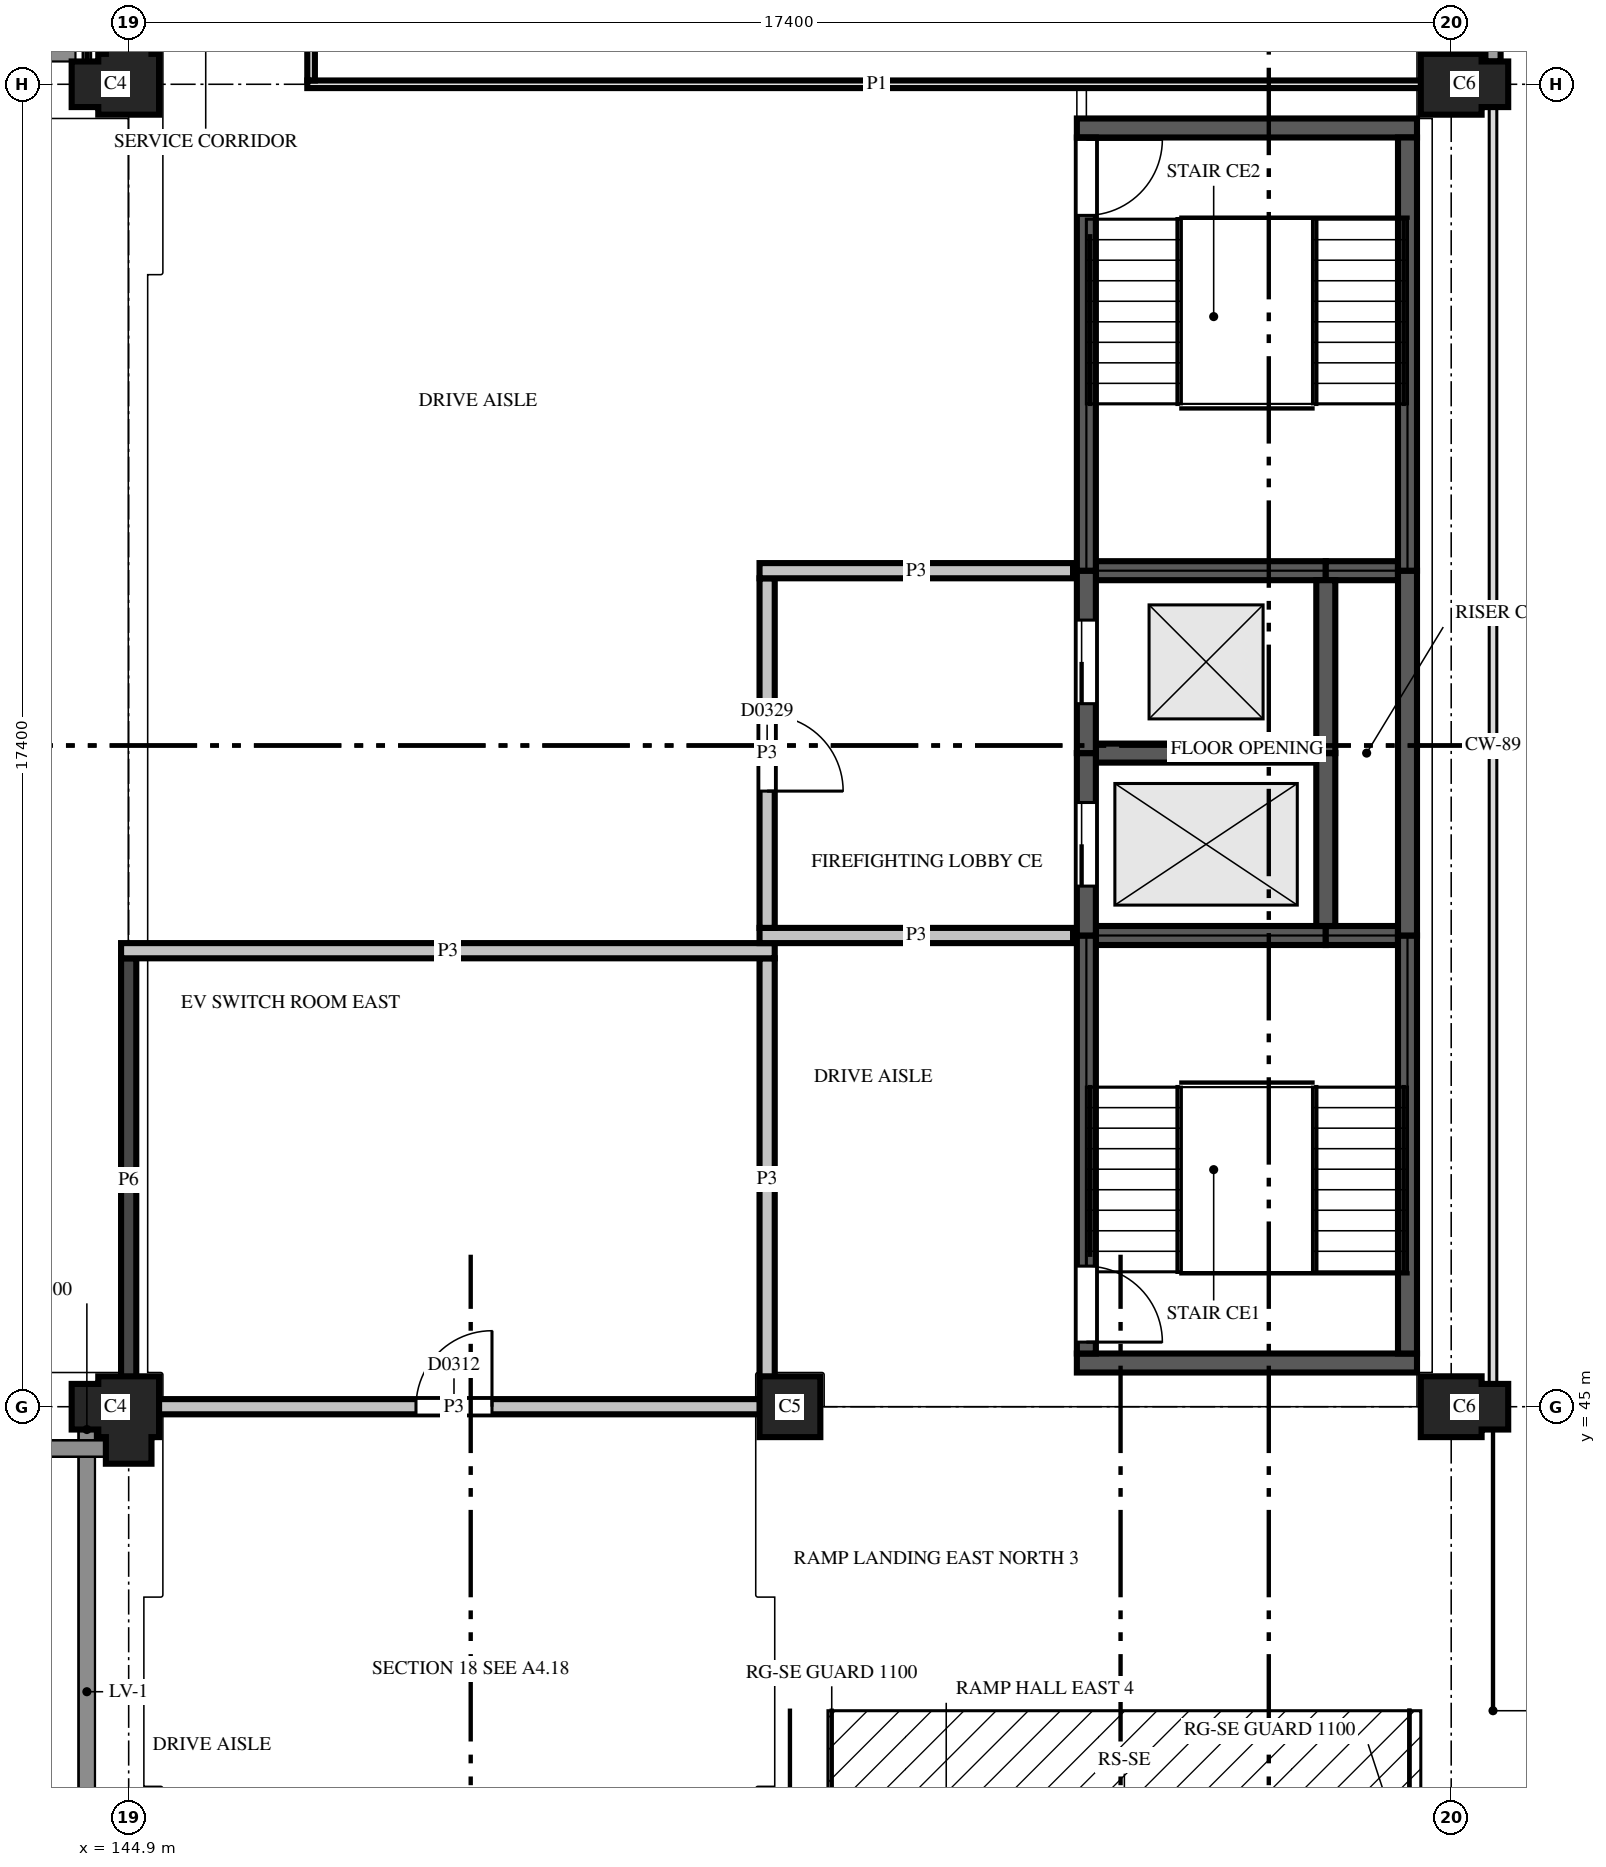
"""IFC4 building model, lengths in metres.
Left out: names, types, materials, properties, quantities, classifications, styles, units other than length and angle.
Written with IfcOpenShell. Run it as: python <this file> out.ifc"""

import sys

from ifc_helpers import new_model, si_unit, direction, frame, frame_2d, origin, place, context, subcontext, project, spatial, polyline, rectangle, outline, extrude, element, fill, save


model = new_model("IFC4")
c1 = context("Model", 3, precision=1e-05, world=origin(), true_north=direction((0.0, 1.0)))
c2 = subcontext(c1, "Body", "Model", "MODEL_VIEW")
j1 = project(units=[si_unit("LENGTHUNIT", "METRE"), si_unit("PLANEANGLEUNIT", "RADIAN")], contexts=[c1])
p1 = place(None, origin())
s1 = spatial("IfcSite", under=j1, at=p1, CompositionType="ELEMENT")
p2 = place(p1, origin())
s2 = spatial("IfcBuilding", under=s1, at=p2, CompositionType="ELEMENT")
p3 = place(p2, frame((0.0, 0.0, 11.9)))
s3 = spatial("IfcBuildingStorey", under=s2, at=p3, CompositionType="ELEMENT", Elevation=11.9)
p4 = place(p3, frame((144.9, 45.0, 0.0), z_axis=(0.0, 0.0, 1.0), x_axis=(-1.0, 0.0, 0.0)))
e1 = element("IfcColumn", 1, at=p4, inside=s3, PredefinedType="COLUMN", context=c2, shape_type="SweptSolid", body=[
    extrude(outline(polyline([(-0.4, -0.4), (0.4, -0.4), (0.4, -0.3), (0.75, -0.3), (0.75, 0.3), (0.4, 0.3), (0.4, 0.4), (0.3, 0.4), (0.3, 0.75), (-0.3, 0.75), (-0.3, 0.4), (-0.4, 0.4), (-0.4, -0.4)])), origin(), (0.0, 0.0, 1.0), 3.7),
])
p5 = place(p3, frame((153.6, 45.0, 0.0), z_axis=(0.0, 0.0, 1.0), x_axis=(1.0, 0.0, 0.0)))
e2 = element("IfcColumn", 2, at=p5, inside=s3, PredefinedType="COLUMN", context=c2, shape_type="SweptSolid", body=[
    extrude(outline(polyline([(-0.4, -0.4), (0.4, -0.4), (0.4, 0.4), (-0.4, 0.4), (-0.4, -0.4)])), origin(), (0.0, 0.0, 1.0), 3.7),
])
p6 = place(p3, frame((162.3, 45.0, 0.0), z_axis=(0.0, 0.0, 1.0), x_axis=(1.0, 0.0, 0.0)))
e3 = element("IfcColumn", 3, at=p6, inside=s3, PredefinedType="COLUMN", context=c2, shape_type="SweptSolid", body=[
    extrude(outline(polyline([(-0.4, -0.4), (0.4, -0.4), (0.4, -0.3), (0.75, -0.3), (0.75, 0.3), (0.4, 0.3), (0.4, 0.4), (-0.4, 0.4), (-0.4, -0.4)])), origin(), (0.0, 0.0, 1.0), 3.7),
])
p7 = place(p3, frame((144.9, 62.4, 0.0), z_axis=(0.0, 0.0, 1.0), x_axis=(0.0, 1.0, 0.0)))
e4 = element("IfcColumn", 4, at=p7, inside=s3, PredefinedType="COLUMN", context=c2, shape_type="SweptSolid", body=[
    extrude(outline(polyline([(-0.4, -0.4), (0.4, -0.4), (0.4, -0.3), (0.75, -0.3), (0.75, 0.3), (0.4, 0.3), (0.4, 0.4), (0.3, 0.4), (0.3, 0.75), (-0.3, 0.75), (-0.3, 0.4), (-0.4, 0.4), (-0.4, -0.4)])), origin(), (0.0, 0.0, 1.0), 3.7),
])
p8 = place(p3, frame((162.3, 62.4, 0.0), z_axis=(0.0, 0.0, 1.0), x_axis=(1.0, 0.0, 0.0)))
e5 = element("IfcColumn", 5, at=p8, inside=s3, PredefinedType="COLUMN", context=c2, shape_type="SweptSolid", body=[
    extrude(outline(polyline([(-0.4, -0.4), (0.4, -0.4), (0.4, -0.3), (0.75, -0.3), (0.75, 0.3), (0.4, 0.3), (0.4, 0.4), (-0.4, 0.4), (-0.4, -0.4)])), origin(), (0.0, 0.0, 1.0), 3.7),
])
p9 = place(p3, frame((157.375, 45.575, 0.0), z_axis=(0.0, 0.0, 1.0), x_axis=(1.0, 0.0, 0.0)))
e6 = element("IfcWall", 6, at=p9, inside=s3, PredefinedType="SHEAR", context=c2, shape_type="SweptSolid", body=[
    extrude(rectangle(XDim=4.475, YDim=0.25, at=frame_2d((2.238, 0.0))), origin(), (0.0, 0.0, 1.0), 3.7),
])
p10 = place(p3, frame((157.625, 51.2, 0.0), z_axis=(0.0, 0.0, 1.0), x_axis=(1.0, 0.0, 0.0)))
e7 = element("IfcWall", 7, at=p10, inside=s3, PredefinedType="SHEAR", context=c2, shape_type="SweptSolid", body=[
    extrude(rectangle(XDim=3.025, YDim=0.25, at=frame_2d((1.512, 0.0))), origin(), (0.0, 0.0, 1.0), 3.7),
])
p11 = place(p3, frame((160.65, 51.2, 0.0), z_axis=(0.0, 0.0, 1.0), x_axis=(1.0, 0.0, 0.0)))
e8 = element("IfcWall", 8, at=p11, inside=s3, PredefinedType="SHEAR", context=c2, shape_type="SweptSolid", body=[
    extrude(rectangle(XDim=0.95, YDim=0.25, at=frame_2d((0.475, 0.0))), origin(), (0.0, 0.0, 1.0), 3.7),
])
p12 = place(p3, frame((157.625, 53.6, 0.0), z_axis=(0.0, 0.0, 1.0), x_axis=(1.0, 0.0, 0.0)))
e9 = element("IfcWall", 9, at=p12, inside=s3, PredefinedType="SHEAR", context=c2, shape_type="SweptSolid", body=[
    extrude(rectangle(XDim=2.9, YDim=0.25, at=frame_2d((1.45, 0.0))), origin(), (0.0, 0.0, 1.0), 3.7),
])
p13 = place(p3, frame((157.625, 56.0, 0.0), z_axis=(0.0, 0.0, 1.0), x_axis=(1.0, 0.0, 0.0)))
e10 = element("IfcWall", 10, at=p13, inside=s3, PredefinedType="SHEAR", context=c2, shape_type="SweptSolid", body=[
    extrude(rectangle(XDim=3.025, YDim=0.25, at=frame_2d((1.512, 0.0))), origin(), (0.0, 0.0, 1.0), 3.7),
])
p14 = place(p3, frame((160.65, 56.0, 0.0), z_axis=(0.0, 0.0, 1.0), x_axis=(1.0, 0.0, 0.0)))
e11 = element("IfcWall", 11, at=p14, inside=s3, PredefinedType="SHEAR", context=c2, shape_type="SweptSolid", body=[
    extrude(rectangle(XDim=0.95, YDim=0.25, at=frame_2d((0.475, 0.0))), origin(), (0.0, 0.0, 1.0), 3.7),
])
p15 = place(p3, frame((157.375, 61.825, 0.0), z_axis=(0.0, 0.0, 1.0), x_axis=(1.0, 0.0, 0.0)))
e12 = element("IfcWall", 12, at=p15, inside=s3, PredefinedType="SHEAR", context=c2, shape_type="SweptSolid", body=[
    extrude(rectangle(XDim=4.475, YDim=0.25, at=frame_2d((2.238, 0.0))), origin(), (0.0, 0.0, 1.0), 3.7),
])
p16 = place(p3, frame((157.5, 45.7, 0.0), z_axis=(0.0, 0.0, 1.0), x_axis=(0.0, 1.0, 0.0)))
e13 = element("IfcWall", 13, at=p16, inside=s3, PredefinedType="SHEAR", context=c2, shape_type="SweptSolid", body=[
    extrude(rectangle(XDim=5.5, YDim=0.25, at=frame_2d((2.75, 0.0))), origin(), (0.0, 0.0, 1.0), 3.7),
])
p17 = place(p16, frame((0.15, 0.0, 0.0)))
e14 = element("IfcOpeningElement", 14, at=p17, cuts=e13, PredefinedType="OPENING", context=c2, shape_type="SweptSolid", body=[
    extrude(rectangle(XDim=1.0, YDim=2.1, at=frame_2d((0.5, 1.05))), frame((0.0, 0.135, 0.0), z_axis=(0.0, -1.0, 0.0), x_axis=(1.0, 0.0, 0.0)), (0.0, 0.0, 1.0), 0.27),
])
p18 = place(p3, frame((157.5, 51.2, 0.0), z_axis=(0.0, 0.0, 1.0), x_axis=(0.0, 1.0, 0.0)))
e15 = element("IfcWall", 15, at=p18, inside=s3, PredefinedType="SHEAR", context=c2, shape_type="SweptSolid", body=[
    extrude(rectangle(XDim=2.4, YDim=0.25, at=frame_2d((1.2, 0.0))), origin(), (0.0, 0.0, 1.0), 3.7),
])
p19 = place(p18, frame((0.65, 0.0, 0.0)))
e16 = element("IfcOpeningElement", 16, at=p19, cuts=e15, PredefinedType="OPENING", context=c2, shape_type="SweptSolid", body=[
    extrude(rectangle(XDim=1.1, YDim=2.1, at=frame_2d((0.55, 1.05))), frame((0.0, 0.135, 0.0), z_axis=(0.0, -1.0, 0.0), x_axis=(1.0, 0.0, 0.0)), (0.0, 0.0, 1.0), 0.27),
])
p20 = place(p3, frame((157.5, 53.6, 0.0), z_axis=(0.0, 0.0, 1.0), x_axis=(0.0, 1.0, 0.0)))
e17 = element("IfcWall", 17, at=p20, inside=s3, PredefinedType="SHEAR", context=c2, shape_type="SweptSolid", body=[
    extrude(rectangle(XDim=2.4, YDim=0.25, at=frame_2d((1.2, 0.0))), origin(), (0.0, 0.0, 1.0), 3.7),
])
p21 = place(p20, frame((0.65, 0.0, 0.0)))
e18 = element("IfcOpeningElement", 18, at=p21, cuts=e17, PredefinedType="OPENING", context=c2, shape_type="SweptSolid", body=[
    extrude(rectangle(XDim=1.1, YDim=2.1, at=frame_2d((0.55, 1.05))), frame((0.0, 0.135, 0.0), z_axis=(0.0, -1.0, 0.0), x_axis=(1.0, 0.0, 0.0)), (0.0, 0.0, 1.0), 0.27),
])
p22 = place(p3, frame((157.5, 56.0, 0.0), z_axis=(0.0, 0.0, 1.0), x_axis=(0.0, 1.0, 0.0)))
e19 = element("IfcWall", 19, at=p22, inside=s3, PredefinedType="SHEAR", context=c2, shape_type="SweptSolid", body=[
    extrude(rectangle(XDim=5.7, YDim=0.25, at=frame_2d((2.85, 0.0))), origin(), (0.0, 0.0, 1.0), 3.7),
])
p23 = place(p22, frame((4.675, 0.0, 0.0)))
e20 = element("IfcOpeningElement", 20, at=p23, cuts=e19, PredefinedType="OPENING", context=c2, shape_type="SweptSolid", body=[
    extrude(rectangle(XDim=1.0, YDim=2.1, at=frame_2d((0.5, 1.05))), frame((0.0, 0.135, 0.0), z_axis=(0.0, -1.0, 0.0), x_axis=(1.0, 0.0, 0.0)), (0.0, 0.0, 1.0), 0.27),
])
p24 = place(p3, frame((160.65, 51.325, 0.0), z_axis=(0.0, 0.0, 1.0), x_axis=(0.0, 1.0, 0.0)))
e21 = element("IfcWall", 21, at=p24, inside=s3, PredefinedType="SHEAR", context=c2, shape_type="SweptSolid", body=[
    extrude(rectangle(XDim=2.275, YDim=0.25, at=frame_2d((1.138, 0.0))), origin(), (0.0, 0.0, 1.0), 3.7),
])
p25 = place(p3, frame((160.65, 53.6, 0.0), z_axis=(0.0, 0.0, 1.0), x_axis=(0.0, 1.0, 0.0)))
e22 = element("IfcWall", 22, at=p25, inside=s3, PredefinedType="SHEAR", context=c2, shape_type="SweptSolid", body=[
    extrude(rectangle(XDim=2.275, YDim=0.25, at=frame_2d((1.137, 0.0))), origin(), (0.0, 0.0, 1.0), 3.7),
])
p26 = place(p3, frame((161.725, 45.7, 0.0), z_axis=(0.0, 0.0, 1.0), x_axis=(0.0, 1.0, 0.0)))
e23 = element("IfcWall", 23, at=p26, inside=s3, PredefinedType="SHEAR", context=c2, shape_type="SweptSolid", body=[
    extrude(rectangle(XDim=5.5, YDim=0.25, at=frame_2d((2.75, 0.0))), origin(), (0.0, 0.0, 1.0), 3.7),
])
p27 = place(p3, frame((161.725, 51.2, 0.0), z_axis=(0.0, 0.0, 1.0), x_axis=(0.0, 1.0, 0.0)))
e24 = element("IfcWall", 24, at=p27, inside=s3, PredefinedType="SHEAR", context=c2, shape_type="SweptSolid", body=[
    extrude(rectangle(XDim=4.8, YDim=0.25, at=frame_2d((2.4, 0.0))), origin(), (0.0, 0.0, 1.0), 3.7),
])
p28 = place(p3, frame((161.725, 56.0, 0.0), z_axis=(0.0, 0.0, 1.0), x_axis=(0.0, 1.0, 0.0)))
e25 = element("IfcWall", 25, at=p28, inside=s3, PredefinedType="SHEAR", context=c2, shape_type="SweptSolid", body=[
    extrude(rectangle(XDim=5.7, YDim=0.25, at=frame_2d((2.85, 0.0))), origin(), (0.0, 0.0, 1.0), 3.7),
])
p29 = place(p3, frame((162.85, 62.7, 0.0), z_axis=(0.0, 0.0, 1.0), x_axis=(0.0, 1.0, 0.0)))
e26 = element("IfcWall", 26, at=p29, inside=s3, PredefinedType="SOLIDWALL", context=c2, shape_type="SweptSolid", body=[
    extrude(rectangle(XDim=6.9, YDim=0.2, at=frame_2d((3.45, 0.0))), origin(), (0.0, 0.0, 1.0), 2.3),
])
p30 = place(p29, frame((2.25, 0.0, 0.55)))
e27 = element("IfcOpeningElement", 27, at=p30, cuts=e26, PredefinedType="OPENING", context=c2, shape_type="SweptSolid", body=[
    extrude(rectangle(XDim=2.4, YDim=1.0, at=frame_2d((1.2, 0.5))), frame((0.0, 0.11, 0.0), z_axis=(0.0, -1.0, 0.0), x_axis=(1.0, 0.0, 0.0)), (0.0, 0.0, 1.0), 0.22),
])
p31 = place(p3, frame((144.96, 45.0, 0.0), z_axis=(0.0, 0.0, 1.0), x_axis=(1.0, 0.0, 0.0)))
e28 = element("IfcWall", 28, at=p31, inside=s3, PredefinedType="PARTITIONING", context=c2, shape_type="SweptSolid", body=[
    extrude(rectangle(XDim=8.44, YDim=0.2, at=frame_2d((4.22, 0.0))), origin(), (0.0, 0.0, 1.0), 2.88),
])
p32 = place(p31, frame((3.72, 0.0, 0.0)))
e29 = element("IfcOpeningElement", 29, at=p32, cuts=e28, PredefinedType="OPENING", context=c2, shape_type="SweptSolid", body=[
    extrude(rectangle(XDim=1.0, YDim=2.1, at=frame_2d((0.5, 1.05))), frame((0.0, 0.11, 0.0), z_axis=(0.0, -1.0, 0.0), x_axis=(1.0, 0.0, 0.0)), (0.0, 0.0, 1.0), 0.22),
])
p33 = place(p3, frame((153.3, 45.1, 0.0), z_axis=(0.0, 0.0, 1.0), x_axis=(0.0, 1.0, 0.0)))
e30 = element("IfcWall", 30, at=p33, inside=s3, PredefinedType="PARTITIONING", context=c2, shape_type="SweptSolid", body=[
    extrude(rectangle(XDim=5.8, YDim=0.2, at=frame_2d((2.9, 0.0))), origin(), (0.0, 0.0, 1.0), 2.88),
])
p34 = place(p3, frame((144.9, 50.9, 0.0), z_axis=(0.0, 0.0, 1.0), x_axis=(0.0, -1.0, 0.0)))
e31 = element("IfcWall", 31, at=p34, inside=s3, PredefinedType="PARTITIONING", context=c2, shape_type="SweptSolid", body=[
    extrude(rectangle(XDim=5.84, YDim=0.2, at=frame_2d((2.92, 0.0))), origin(), (0.0, 0.0, 1.0), 2.2),
])
p35 = place(p3, frame((153.4, 51.0, 0.0), z_axis=(0.0, 0.0, 1.0), x_axis=(-1.0, 0.0, 0.0)))
e32 = element("IfcWall", 32, at=p35, inside=s3, PredefinedType="PARTITIONING", context=c2, shape_type="SweptSolid", body=[
    extrude(rectangle(XDim=8.6, YDim=0.2, at=frame_2d((4.3, 0.0))), origin(), (0.0, 0.0, 1.0), 2.88),
])
p36 = place(p3, frame((153.2, 51.2, 0.0), z_axis=(0.0, 0.0, 1.0), x_axis=(1.0, 0.0, 0.0)))
e33 = element("IfcWall", 33, at=p36, inside=s3, PredefinedType="PARTITIONING", context=c2, shape_type="SweptSolid", body=[
    extrude(rectangle(XDim=4.125, YDim=0.2, at=frame_2d((2.062, 0.0))), origin(), (0.0, 0.0, 1.0), 2.88),
])
p37 = place(p3, frame((153.3, 55.9, 0.0), z_axis=(0.0, 0.0, 1.0), x_axis=(0.0, -1.0, 0.0)))
e34 = element("IfcWall", 34, at=p37, inside=s3, PredefinedType="PARTITIONING", context=c2, shape_type="SweptSolid", body=[
    extrude(rectangle(XDim=4.6, YDim=0.2, at=frame_2d((2.3, 0.0))), origin(), (0.0, 0.0, 1.0), 2.88),
])
p38 = place(p37, frame((1.8, 0.0, 0.0)))
e35 = element("IfcOpeningElement", 35, at=p38, cuts=e34, PredefinedType="OPENING", context=c2, shape_type="SweptSolid", body=[
    extrude(rectangle(XDim=1.0, YDim=2.1, at=frame_2d((0.5, 1.05))), frame((0.0, 0.11, 0.0), z_axis=(0.0, -1.0, 0.0), x_axis=(1.0, 0.0, 0.0)), (0.0, 0.0, 1.0), 0.22),
])
p39 = place(p3, frame((157.325, 56.0, 0.0), z_axis=(0.0, 0.0, 1.0), x_axis=(-1.0, 0.0, 0.0)))
e36 = element("IfcWall", 36, at=p39, inside=s3, PredefinedType="PARTITIONING", context=c2, shape_type="SweptSolid", body=[
    extrude(rectangle(XDim=4.125, YDim=0.2, at=frame_2d((2.062, 0.0))), origin(), (0.0, 0.0, 1.0), 2.88),
])
p40 = place(p3, frame((147.25, 62.4, 0.0), z_axis=(0.0, 0.0, 1.0), x_axis=(1.0, 0.0, 0.0)))
e37 = element("IfcWall", 37, at=p40, inside=s3, PredefinedType="PARTITIONING", context=c2, shape_type="SweptSolid", body=[
    extrude(rectangle(XDim=14.99, YDim=0.1, at=frame_2d((7.495, 0.0))), origin(), (0.0, 0.0, 1.0), 2.88),
])
p41 = place(p3, frame((147.3, 77.35, 0.0), z_axis=(0.0, 0.0, 1.0), x_axis=(0.0, -1.0, 0.0)))
e38 = element("IfcWall", 38, at=p41, inside=s3, PredefinedType="PARTITIONING", context=c2, shape_type="SweptSolid", body=[
    extrude(rectangle(XDim=14.9, YDim=0.1, at=frame_2d((7.45, 0.0))), origin(), (0.0, 0.0, 1.0), 2.88),
])
p42 = place(p41, frame((7.0, 0.0, 0.0)))
e39 = element("IfcOpeningElement", 39, at=p42, cuts=e38, PredefinedType="OPENING", context=c2, shape_type="SweptSolid", body=[
    extrude(rectangle(XDim=0.9, YDim=2.1, at=frame_2d((0.45, 1.05))), frame((0.0, 0.06, 0.0), z_axis=(0.0, -1.0, 0.0), x_axis=(1.0, 0.0, 0.0)), (0.0, 0.0, 1.0), 0.12),
])
p43 = place(p32, origin())
e40 = element("IfcDoor", 40, at=p43, inside=s3, OperationType="SINGLE_SWING_LEFT", PredefinedType="DOOR", context=c2, shape_type="SweptSolid", body=[
    extrude(rectangle(XDim=1.0, YDim=2.1, at=frame_2d((0.5, 1.05))), frame((0.0, 0.025, 0.0), z_axis=(0.0, -1.0, 0.0), x_axis=(1.0, 0.0, 0.0)), (0.0, 0.0, 1.0), 0.05),
])
fill(e29, e40)
p44 = place(p38, origin())
e41 = element("IfcDoor", 41, at=p44, inside=s3, OperationType="SINGLE_SWING_LEFT", PredefinedType="DOOR", context=c2, shape_type="SweptSolid", body=[
    extrude(rectangle(XDim=1.0, YDim=2.1, at=frame_2d((0.5, 1.05))), frame((0.0, 0.025, 0.0), z_axis=(0.0, -1.0, 0.0), x_axis=(1.0, 0.0, 0.0)), (0.0, 0.0, 1.0), 0.05),
])
fill(e35, e41)
p45 = place(p19, origin())
e42 = element("IfcDoor", 42, at=p45, inside=s3, OperationType="SLIDING_TO_LEFT", PredefinedType="DOOR", context=c2, shape_type="SweptSolid", body=[
    extrude(rectangle(XDim=1.1, YDim=2.1, at=frame_2d((0.55, 1.05))), frame((0.0, 0.025, 0.0), z_axis=(0.0, -1.0, 0.0), x_axis=(1.0, 0.0, 0.0)), (0.0, 0.0, 1.0), 0.05),
])
fill(e16, e42)
p46 = place(p21, origin())
e43 = element("IfcDoor", 43, at=p46, inside=s3, OperationType="SLIDING_TO_LEFT", PredefinedType="DOOR", context=c2, shape_type="SweptSolid", body=[
    extrude(rectangle(XDim=1.1, YDim=2.1, at=frame_2d((0.55, 1.05))), frame((0.0, 0.025, 0.0), z_axis=(0.0, -1.0, 0.0), x_axis=(1.0, 0.0, 0.0)), (0.0, 0.0, 1.0), 0.05),
])
fill(e18, e43)
p47 = place(p23, origin())
e44 = element("IfcDoor", 44, at=p47, inside=s3, OperationType="SINGLE_SWING_RIGHT", PredefinedType="DOOR", context=c2, shape_type="SweptSolid", body=[
    extrude(rectangle(XDim=1.0, YDim=2.1, at=frame_2d((0.5, 1.05))), frame((0.0, 0.025, 0.0), z_axis=(0.0, -1.0, 0.0), x_axis=(1.0, 0.0, 0.0)), (0.0, 0.0, 1.0), 0.05),
])
fill(e20, e44)
p48 = place(p17, origin())
e45 = element("IfcDoor", 45, at=p48, inside=s3, OperationType="SINGLE_SWING_LEFT", PredefinedType="DOOR", context=c2, shape_type="SweptSolid", body=[
    extrude(rectangle(XDim=1.0, YDim=2.1, at=frame_2d((0.5, 1.05))), frame((0.0, 0.025, 0.0), z_axis=(0.0, -1.0, 0.0), x_axis=(1.0, 0.0, 0.0)), (0.0, 0.0, 1.0), 0.05),
])
fill(e14, e45)
save(model, sys.argv[1])
